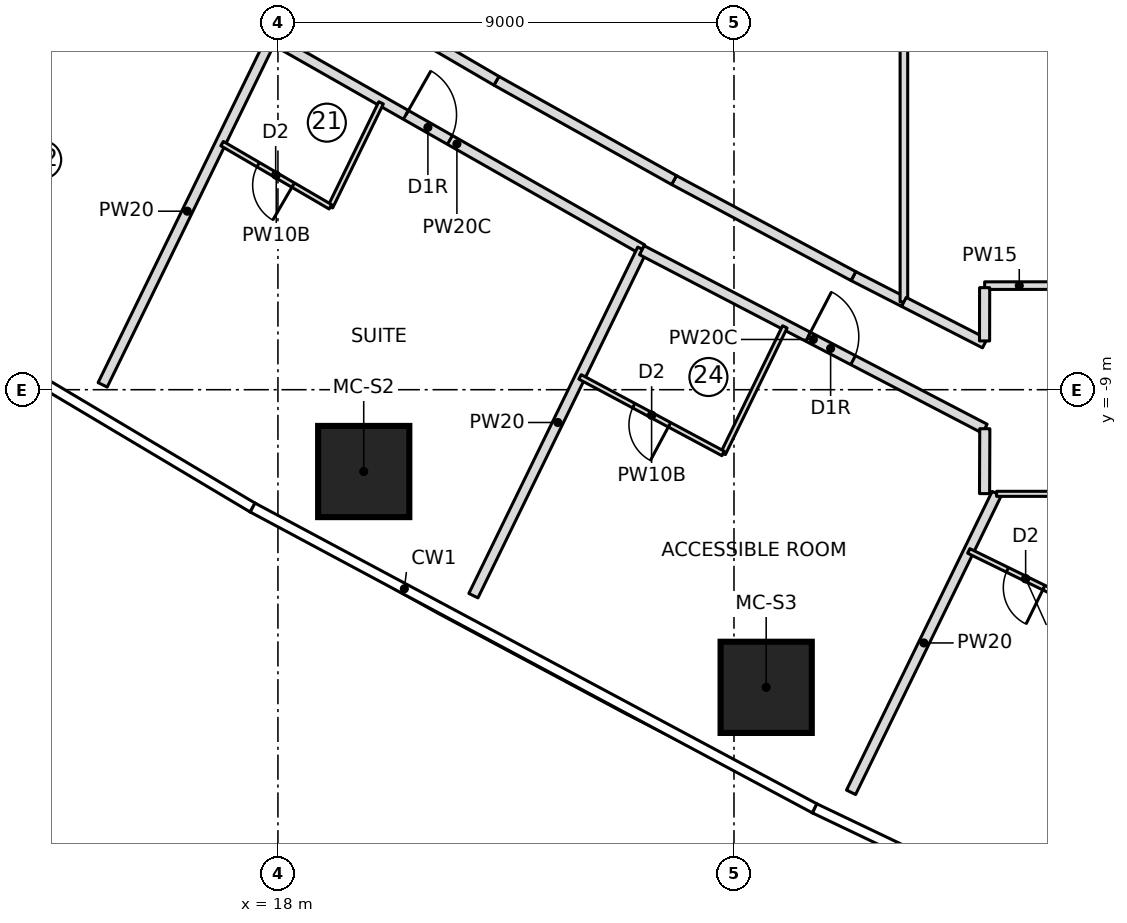
"""IFC4 building model, lengths in metres.
Left out: names, types, materials, properties, quantities, classifications, styles, units other than length and angle.
Written with IfcOpenShell. Run it as: python <this file> out.ifc"""

import sys

from ifc_helpers import new_model, si_unit, direction, frame, frame_2d, origin, origin_2d, place, context, subcontext, project, spatial, rectangle, extrude, element, fill, save


model = new_model("IFC4")
c1 = context("Model", 3, precision=1e-05, world=origin(), true_north=direction((0.0, 1.0)))
c2 = subcontext(c1, "Body", "Model", "MODEL_VIEW")
j1 = project(units=[si_unit("LENGTHUNIT", "METRE"), si_unit("PLANEANGLEUNIT", "RADIAN")], contexts=[c1])
p1 = place(None, origin())
s1 = spatial("IfcSite", under=j1, at=p1, CompositionType="ELEMENT")
p2 = place(p1, origin())
s2 = spatial("IfcBuilding", under=s1, at=p2, CompositionType="ELEMENT")
p3 = place(p2, frame((0.0, 0.0, 50.25)))
s3 = spatial("IfcBuildingStorey", under=s2, at=p3, CompositionType="ELEMENT", Elevation=50.25)
for number, where, z_axis, x_axis in (
    (1, (19.693, -10.615, 0.0), (0.0, 0.0, 1.0), (1.0, 0.0, 0.0)),
    (2, (27.635, -14.874, 0.0), (0.0, 0.0, 1.0), (1.0, 0.0, 0.0)),
):
    element("IfcColumn", number, at=place(p3, frame(where, z_axis=z_axis, x_axis=x_axis)), inside=s3, PredefinedType="COLUMN", context=c2, shape_type="SweptSolid", body=[
        extrude(rectangle(XDim=1.8, YDim=1.8, at=origin_2d()), origin(), (0.0, 0.0, 1.0), 3.55),
    ])
p4 = place(p3, frame((14.541, -8.904, 0.0), z_axis=(0.0, 0.0, 1.0), x_axis=(0.438213564788, 0.898870887078, 0.0)))
e3 = element("IfcWall", 3, at=p4, inside=s3, PredefinedType="PARTITIONING", context=c2, shape_type="SweptSolid", body=[
    extrude(rectangle(XDim=7.625, YDim=0.2, at=frame_2d((3.813, 0.0))), origin(), (0.0, 0.0, 1.0), 3.25),
])
p5 = place(p3, frame((17.874, -2.068, 0.0), z_axis=(0.0, 0.0, 1.0), x_axis=(0.869280098963, -0.494319845391, 0.0)))
e4 = element("IfcWall", 4, at=p5, inside=s3, PredefinedType="PARTITIONING", context=c2, shape_type="SweptSolid", body=[
    extrude(rectangle(XDim=8.417, YDim=0.2, at=frame_2d((4.208, 0.0))), origin(), (0.0, 0.0, 1.0), 3.25),
])
p6 = place(p5, frame((3.05, 0.0, 0.0)))
e5 = element("IfcOpeningElement", 5, at=p6, cuts=e4, PredefinedType="OPENING", context=c2, shape_type="SweptSolid", body=[
    extrude(rectangle(XDim=1.0, YDim=2.1, at=frame_2d((0.5, 1.05))), frame((0.0, 0.11, 0.0), z_axis=(0.0, -1.0, 0.0), x_axis=(1.0, 0.0, 0.0)), (0.0, 0.0, 1.0), 0.22),
])
p7 = place(p3, frame((20.035, -3.338, 0.0), z_axis=(0.0, 0.0, 1.0), x_axis=(-0.438122322582, -0.898915363344, 0.0)))
e6 = element("IfcWall", 6, at=p7, inside=s3, PredefinedType="PARTITIONING", context=c2, shape_type="SweptSolid", body=[
    extrude(rectangle(XDim=2.283, YDim=0.1, at=frame_2d((1.142, 0.0))), origin(), (0.0, 0.0, 1.0), 3.25),
])
p8 = place(p3, frame((19.035, -5.39, 0.0), z_axis=(0.0, 0.0, 1.0), x_axis=(-0.863707305865, 0.503993739837, 0.0)))
e7 = element("IfcWall", 7, at=p8, inside=s3, PredefinedType="PARTITIONING", context=c2, shape_type="SweptSolid", body=[
    extrude(rectangle(XDim=2.474, YDim=0.1, at=frame_2d((1.237, 0.0))), origin(), (0.0, 0.0, 1.0), 3.25),
])
p9 = place(p8, frame((0.85, 0.0, 0.0)))
e8 = element("IfcOpeningElement", 8, at=p9, cuts=e7, PredefinedType="OPENING", context=c2, shape_type="SweptSolid", body=[
    extrude(rectangle(XDim=0.8, YDim=2.1, at=frame_2d((0.4, 1.05))), frame((0.0, 0.06, 0.0), z_axis=(0.0, -1.0, 0.0), x_axis=(1.0, 0.0, 0.0)), (0.0, 0.0, 1.0), 0.12),
])
p10 = place(p3, frame((21.857, -13.065, 0.0), z_axis=(0.0, 0.0, 1.0), x_axis=(0.438202895602, 0.898876088394, 0.0)))
e9 = element("IfcWall", 9, at=p10, inside=s3, PredefinedType="PARTITIONING", context=c2, shape_type="SweptSolid", body=[
    extrude(rectangle(XDim=7.605, YDim=0.2, at=frame_2d((3.803, 0.0))), origin(), (0.0, 0.0, 1.0), 3.25),
])
p11 = place(p3, frame((25.181, -6.247, 0.0), z_axis=(0.0, 0.0, 1.0), x_axis=(0.887026569793, -0.461718382221, 0.0)))
e10 = element("IfcWall", 10, at=p11, inside=s3, PredefinedType="PARTITIONING", context=c2, shape_type="SweptSolid", body=[
    extrude(rectangle(XDim=7.631, YDim=0.2, at=frame_2d((3.815, 0.0))), origin(), (0.0, 0.0, 1.0), 3.25),
])
p12 = place(p11, frame((3.7, 0.0, 0.0)))
e11 = element("IfcOpeningElement", 11, at=p12, cuts=e10, PredefinedType="OPENING", context=c2, shape_type="SweptSolid", body=[
    extrude(rectangle(XDim=1.0, YDim=2.1, at=frame_2d((0.5, 1.05))), frame((0.0, 0.11, 0.0), z_axis=(0.0, -1.0, 0.0), x_axis=(1.0, 0.0, 0.0)), (0.0, 0.0, 1.0), 0.22),
])
p13 = place(p3, frame((28.003, -7.761, 0.0), z_axis=(0.0, 0.0, 1.0), x_axis=(-0.43822975423, -0.898862994292, 0.0)))
e12 = element("IfcWall", 12, at=p13, inside=s3, PredefinedType="PARTITIONING", context=c2, shape_type="SweptSolid", body=[
    extrude(rectangle(XDim=2.779, YDim=0.1, at=frame_2d((1.389, 0.0))), origin(), (0.0, 0.0, 1.0), 3.25),
])
p14 = place(p3, frame((26.785, -10.259, 0.0), z_axis=(0.0, 0.0, 1.0), x_axis=(-0.881653338438, 0.471897648672, 0.0)))
e13 = element("IfcWall", 13, at=p14, inside=s3, PredefinedType="PARTITIONING", context=c2, shape_type="SweptSolid", body=[
    extrude(rectangle(XDim=3.202, YDim=0.1, at=frame_2d((1.601, 0.0))), origin(), (0.0, 0.0, 1.0), 3.25),
])
p15 = place(p14, frame((1.2, 0.0, 0.0)))
e14 = element("IfcOpeningElement", 14, at=p15, cuts=e13, PredefinedType="OPENING", context=c2, shape_type="SweptSolid", body=[
    extrude(rectangle(XDim=0.8, YDim=2.1, at=frame_2d((0.4, 1.05))), frame((0.0, 0.06, 0.0), z_axis=(0.0, -1.0, 0.0), x_axis=(1.0, 0.0, 0.0)), (0.0, 0.0, 1.0), 0.12),
])
p16 = place(p3, frame((29.31, -16.946, 0.0), z_axis=(0.0, 0.0, 1.0), x_axis=(0.438228560869, 0.898863576099, 0.0)))
e15 = element("IfcWall", 15, at=p16, inside=s3, PredefinedType="PARTITIONING", context=c2, shape_type="SweptSolid", body=[
    extrude(rectangle(XDim=6.559, YDim=0.2, at=frame_2d((3.28, 0.0))), origin(), (0.0, 0.0, 1.0), 3.25),
])
p17 = place(p3, frame((33.879, -13.28, 0.0), z_axis=(0.0, 0.0, 1.0), x_axis=(-0.89845285455, 0.439070003702, 0.0)))
e16 = element("IfcWall", 16, at=p17, inside=s3, PredefinedType="PARTITIONING", context=c2, shape_type="SweptSolid", body=[
    extrude(rectangle(XDim=2.5, YDim=0.1, at=frame_2d((1.25, 0.0))), origin(), (0.0, 0.0, 1.0), 3.25),
])
p18 = place(p17, frame((0.85, 0.0, 0.0)))
e17 = element("IfcOpeningElement", 17, at=p18, cuts=e16, PredefinedType="OPENING", context=c2, shape_type="SweptSolid", body=[
    extrude(rectangle(XDim=0.8, YDim=2.1, at=frame_2d((0.4, 1.05))), frame((0.0, 0.06, 0.0), z_axis=(0.0, -1.0, 0.0), x_axis=(1.0, 0.0, 0.0)), (0.0, 0.0, 1.0), 0.12),
])
p19 = place(p3, frame((30.353, -7.268, 0.0), z_axis=(0.0, 0.0, 1.0), x_axis=(-0.890241988655, 0.455487872106, 0.0)))
e18 = element("IfcWall", 18, at=p19, inside=s3, PredefinedType="PARTITIONING", context=c2, shape_type="SweptSolid", body=[
    extrude(rectangle(XDim=1.119, YDim=0.2, at=frame_2d((0.559, 0.0))), origin(), (0.0, 0.0, 1.0), 3.25),
])
p20 = place(p3, frame((29.357, -6.758, 0.0), z_axis=(0.0, 0.0, 1.0), x_axis=(-0.881655245922, 0.471894084874, 0.0)))
e19 = element("IfcWall", 19, at=p20, inside=s3, PredefinedType="PARTITIONING", context=c2, shape_type="SweptSolid", body=[
    extrude(rectangle(XDim=4.016, YDim=0.2, at=frame_2d((2.008, 0.0))), origin(), (0.0, 0.0, 1.0), 3.25),
])
p21 = place(p3, frame((25.817, -4.863, 0.0), z_axis=(0.0, 0.0, 1.0), x_axis=(-0.872800289292, 0.488077509225, 0.0)))
e20 = element("IfcWall", 20, at=p21, inside=s3, PredefinedType="PARTITIONING", context=c2, shape_type="SweptSolid", body=[
    extrude(rectangle(XDim=4.016, YDim=0.2, at=frame_2d((2.008, 0.0))), origin(), (0.0, 0.0, 1.0), 3.25),
])
p22 = place(p3, frame((22.312, -2.903, 0.0), z_axis=(0.0, 0.0, 1.0), x_axis=(-0.863710538269, 0.503988200341, 0.0)))
e21 = element("IfcWall", 21, at=p22, inside=s3, PredefinedType="PARTITIONING", context=c2, shape_type="SweptSolid", body=[
    extrude(rectangle(XDim=4.016, YDim=0.2, at=frame_2d((2.008, 0.0))), origin(), (0.0, 0.0, 1.0), 3.25),
])
p23 = place(p3, frame((30.353, -7.268, 0.0), z_axis=(0.0, 0.0, 1.0), x_axis=(0.0, 1.0, 0.0)))
e22 = element("IfcWall", 22, at=p23, inside=s3, PredefinedType="PARTITIONING", context=c2, shape_type="SweptSolid", body=[
    extrude(rectangle(XDim=14.535, YDim=0.15, at=frame_2d((7.268, 0.0))), origin(), (0.0, 0.0, 1.0), 3.25),
])
p24 = place(p3, frame((31.95, -8.085, 0.0), z_axis=(0.0, 0.0, 1.0), x_axis=(-0.890195531144, 0.455578660969, 0.0)))
e23 = element("IfcWall", 23, at=p24, inside=s3, PredefinedType="PARTITIONING", context=c2, shape_type="SweptSolid", body=[
    extrude(rectangle(XDim=1.794, YDim=0.2, at=frame_2d((0.897, 0.0))), origin(), (0.0, 0.0, 1.0), 3.25),
])
p25 = place(p3, frame((32.182, -11.055, 0.0), z_axis=(0.0, 0.0, 1.0), x_axis=(1.0, 0.0, 0.0)))
e24 = element("IfcWall", 24, at=p25, inside=s3, PredefinedType="PARTITIONING", context=c2, shape_type="SweptSolid", body=[
    extrude(rectangle(XDim=2.371, YDim=0.1, at=frame_2d((1.186, 0.0))), origin(), (0.0, 0.0, 1.0), 3.25),
])
p26 = place(p3, frame((33.313, -6.945, 0.0), z_axis=(0.0, 0.0, 1.0), x_axis=(-0.999999744625, -0.00071466839, 0.0)))
e25 = element("IfcWall", 25, at=p26, inside=s3, PredefinedType="PARTITIONING", context=c2, shape_type="SweptSolid", body=[
    extrude(rectangle(XDim=1.366, YDim=0.15, at=frame_2d((0.683, 0.0))), origin(), (0.0, 0.0, 1.0), 3.25),
])
p27 = place(p3, frame((31.947, -6.986, 0.0), z_axis=(0.0, 0.0, 1.0), x_axis=(-0.001625636496, -0.999998678652, 0.0)))
e26 = element("IfcWall", 26, at=p27, inside=s3, PredefinedType="PARTITIONING", context=c2, shape_type="SweptSolid", body=[
    extrude(rectangle(XDim=1.051, YDim=0.2, at=frame_2d((0.526, 0.0))), origin(), (0.0, 0.0, 1.0), 3.25),
])
p28 = place(p3, frame((31.95, -9.77, 0.0), z_axis=(0.0, 0.0, 1.0), x_axis=(-0.003811674235, -0.999992735543, 0.0)))
e27 = element("IfcWall", 27, at=p28, inside=s3, PredefinedType="PARTITIONING", context=c2, shape_type="SweptSolid", body=[
    extrude(rectangle(XDim=1.281, YDim=0.2, at=frame_2d((0.641, 0.0))), origin(), (0.0, 0.0, 1.0), 3.25),
])
p29 = place(p9, origin())
e28 = element("IfcDoor", 28, at=p29, inside=s3, OperationType="SINGLE_SWING_LEFT", PredefinedType="DOOR", context=c2, shape_type="SweptSolid", body=[
    extrude(rectangle(XDim=0.8, YDim=2.1, at=frame_2d((0.4, 1.05))), frame((0.0, 0.025, 0.0), z_axis=(0.0, -1.0, 0.0), x_axis=(1.0, 0.0, 0.0)), (0.0, 0.0, 1.0), 0.05),
])
fill(e8, e28)
p30 = place(p6, origin())
e29 = element("IfcDoor", 29, at=p30, inside=s3, OperationType="SINGLE_SWING_RIGHT", PredefinedType="DOOR", context=c2, shape_type="SweptSolid", body=[
    extrude(rectangle(XDim=1.0, YDim=2.1, at=frame_2d((0.5, 1.05))), frame((0.0, 0.025, 0.0), z_axis=(0.0, -1.0, 0.0), x_axis=(1.0, 0.0, 0.0)), (0.0, 0.0, 1.0), 0.05),
])
fill(e5, e29)
p31 = place(p15, origin())
e30 = element("IfcDoor", 30, at=p31, inside=s3, OperationType="SINGLE_SWING_LEFT", PredefinedType="DOOR", context=c2, shape_type="SweptSolid", body=[
    extrude(rectangle(XDim=0.8, YDim=2.1, at=frame_2d((0.4, 1.05))), frame((0.0, 0.025, 0.0), z_axis=(0.0, -1.0, 0.0), x_axis=(1.0, 0.0, 0.0)), (0.0, 0.0, 1.0), 0.05),
])
fill(e14, e30)
p32 = place(p12, origin())
e31 = element("IfcDoor", 31, at=p32, inside=s3, OperationType="SINGLE_SWING_RIGHT", PredefinedType="DOOR", context=c2, shape_type="SweptSolid", body=[
    extrude(rectangle(XDim=1.0, YDim=2.1, at=frame_2d((0.5, 1.05))), frame((0.0, 0.025, 0.0), z_axis=(0.0, -1.0, 0.0), x_axis=(1.0, 0.0, 0.0)), (0.0, 0.0, 1.0), 0.05),
])
fill(e11, e31)
p33 = place(p18, origin())
e32 = element("IfcDoor", 32, at=p33, inside=s3, OperationType="SINGLE_SWING_LEFT", PredefinedType="DOOR", context=c2, shape_type="SweptSolid", body=[
    extrude(rectangle(XDim=0.8, YDim=2.1, at=frame_2d((0.4, 1.05))), frame((0.0, 0.025, 0.0), z_axis=(0.0, -1.0, 0.0), x_axis=(1.0, 0.0, 0.0)), (0.0, 0.0, 1.0), 0.05),
])
fill(e17, e32)
save(model, sys.argv[1])
